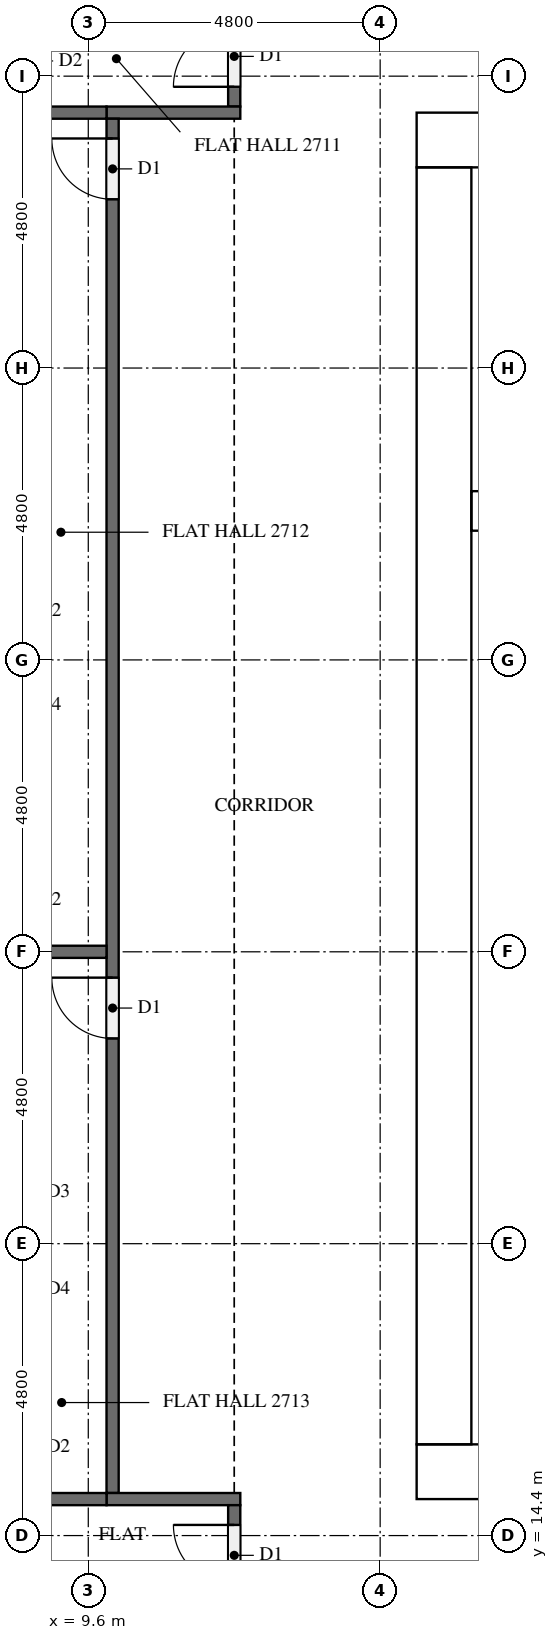
"""IFC4 building model, lengths in metres.
Left out: names, types, materials, properties, quantities, classifications, styles, units other than length and angle.
Written with IfcOpenShell. Run it as: python <this file> out.ifc"""

import sys

from ifc_helpers import new_model, si_unit, direction, frame, frame_2d, origin, place, context, subcontext, project, spatial, rectangle, extrude, element, fill, save


model = new_model("IFC4")
c1 = context("Model", 3, precision=1e-05, world=origin(), true_north=direction((0.0, 1.0)))
c2 = subcontext(c1, "Body", "Model", "MODEL_VIEW")
j1 = project(units=[si_unit("LENGTHUNIT", "METRE"), si_unit("PLANEANGLEUNIT", "RADIAN")], contexts=[c1])
p1 = place(None, origin())
s1 = spatial("IfcSite", under=j1, at=p1, CompositionType="ELEMENT")
p2 = place(p1, origin())
s2 = spatial("IfcBuilding", under=s1, at=p2, CompositionType="ELEMENT")
p3 = place(p2, frame((0.0, 0.0, 106.7)))
s3 = spatial("IfcBuildingStorey", under=s2, at=p3, CompositionType="ELEMENT", Elevation=106.7)
p4 = place(p3, frame((15.0, 15.45, 0.0), z_axis=(0.0, 0.0, 1.0), x_axis=(1.0, 0.0, 0.0)))
e1 = element("IfcWall", 1, at=p4, inside=s3, PredefinedType="SHEAR", context=c2, shape_type="SweptSolid", body=[
    extrude(rectangle(XDim=32.4, YDim=0.9, at=frame_2d((16.2, 0.0))), origin(), (0.0, 0.0, 1.0), 3.2),
])
p5 = place(p4, frame((15.3, 0.0, 0.0)))
e2 = element("IfcOpeningElement", 2, at=p5, cuts=e1, PredefinedType="OPENING", context=c2, shape_type="SweptSolid", body=[
    extrude(rectangle(XDim=1.8, YDim=2.1, at=frame_2d((0.9, 1.05))), frame((0.0, 0.46, 0.0), z_axis=(0.0, -1.0, 0.0), x_axis=(1.0, 0.0, 0.0)), (0.0, 0.0, 1.0), 0.92),
])
p6 = place(p3, frame((15.0, 37.35, 0.0), z_axis=(0.0, 0.0, 1.0), x_axis=(1.0, 0.0, 0.0)))
e3 = element("IfcWall", 3, at=p6, inside=s3, PredefinedType="SHEAR", context=c2, shape_type="SweptSolid", body=[
    extrude(rectangle(XDim=32.4, YDim=0.9, at=frame_2d((16.2, 0.0))), origin(), (0.0, 0.0, 1.0), 3.2),
])
p7 = place(p6, frame((15.3, 0.0, 0.0)))
e4 = element("IfcOpeningElement", 4, at=p7, cuts=e3, PredefinedType="OPENING", context=c2, shape_type="SweptSolid", body=[
    extrude(rectangle(XDim=1.8, YDim=2.1, at=frame_2d((0.9, 1.05))), frame((0.0, 0.46, 0.0), z_axis=(0.0, -1.0, 0.0), x_axis=(1.0, 0.0, 0.0)), (0.0, 0.0, 1.0), 0.92),
])
p8 = place(p6, frame((1.794, 0.0, 0.0)))
e5 = element("IfcOpeningElement", 5, at=p8, cuts=e3, PredefinedType="OPENING", context=c2, shape_type="SweptSolid", body=[
    extrude(rectangle(XDim=1.0, YDim=2.1, at=frame_2d((0.5, 1.05))), frame((0.0, 0.46, 0.0), z_axis=(0.0, -1.0, 0.0), x_axis=(1.0, 0.0, 0.0)), (0.0, 0.0, 1.0), 0.92),
])
p9 = place(p6, frame((5.331, 0.0, 0.0)))
e6 = element("IfcOpeningElement", 6, at=p9, cuts=e3, PredefinedType="OPENING", context=c2, shape_type="SweptSolid", body=[
    extrude(rectangle(XDim=1.0, YDim=2.1, at=frame_2d((0.5, 1.05))), frame((0.0, 0.46, 0.0), z_axis=(0.0, -1.0, 0.0), x_axis=(1.0, 0.0, 0.0)), (0.0, 0.0, 1.0), 0.92),
])
p10 = place(p3, frame((15.45, 15.9, 0.0), z_axis=(0.0, 0.0, 1.0), x_axis=(0.0, 1.0, 0.0)))
e7 = element("IfcWall", 7, at=p10, inside=s3, PredefinedType="SHEAR", context=c2, shape_type="SweptSolid", body=[
    extrude(rectangle(XDim=21.0, YDim=0.9, at=frame_2d((10.5, 0.0))), origin(), (0.0, 0.0, 1.0), 3.2),
])
p11 = place(p10, frame((4.86, 0.0, 0.0)))
e8 = element("IfcOpeningElement", 8, at=p11, cuts=e7, PredefinedType="OPENING", context=c2, shape_type="SweptSolid", body=[
    extrude(rectangle(XDim=1.2, YDim=2.1, at=frame_2d((0.6, 1.05))), frame((0.0, 0.46, 0.0), z_axis=(0.0, -1.0, 0.0), x_axis=(1.0, 0.0, 0.0)), (0.0, 0.0, 1.0), 0.92),
])
p12 = place(p3, frame((15.9, 31.25, 0.0), z_axis=(0.0, 0.0, 1.0), x_axis=(1.0, 0.0, 0.0)))
e9 = element("IfcWall", 9, at=p12, inside=s3, PredefinedType="SHEAR", context=c2, shape_type="SweptSolid", body=[
    extrude(rectangle(XDim=6.875, YDim=0.65, at=frame_2d((3.438, 0.0))), origin(), (0.0, 0.0, 1.0), 3.2),
])
p13 = place(p3, frame((12.0, 37.9, 0.0), z_axis=(0.0, 0.0, 1.0), x_axis=(0.0, 1.0, 0.0)))
e10 = element("IfcWall", 10, at=p13, inside=s3, PredefinedType="PARTITIONING", context=c2, shape_type="SweptSolid", body=[
    extrude(rectangle(XDim=2.8, YDim=0.2, at=frame_2d((1.4, 0.0))), origin(), (0.0, 0.0, 1.0), 3.2),
])
p14 = place(p13, frame((0.325, 0.0, 0.0)))
e11 = element("IfcOpeningElement", 11, at=p14, cuts=e10, PredefinedType="OPENING", context=c2, shape_type="SweptSolid", body=[
    extrude(rectangle(XDim=1.0, YDim=2.1, at=frame_2d((0.5, 1.05))), frame((0.0, 0.11, 0.0), z_axis=(0.0, -1.0, 0.0), x_axis=(1.0, 0.0, 0.0)), (0.0, 0.0, 1.0), 0.22),
])
p15 = place(p3, frame((12.1, 37.8, 0.0), z_axis=(0.0, 0.0, 1.0), x_axis=(-1.0, 0.0, 0.0)))
e12 = element("IfcWall", 12, at=p15, inside=s3, PredefinedType="PARTITIONING", context=c2, shape_type="SweptSolid", body=[
    extrude(rectangle(XDim=2.2, YDim=0.2, at=frame_2d((1.1, 0.0))), origin(), (0.0, 0.0, 1.0), 3.2),
])
p16 = place(p3, frame((10.0, 15.1, 0.0), z_axis=(0.0, 0.0, 1.0), x_axis=(0.0, 1.0, 0.0)))
e13 = element("IfcWall", 13, at=p16, inside=s3, PredefinedType="PARTITIONING", context=c2, shape_type="SweptSolid", body=[
    extrude(rectangle(XDim=22.6, YDim=0.2, at=frame_2d((11.3, 0.0))), origin(), (0.0, 0.0, 1.0), 3.2),
])
p17 = place(p16, frame((21.275, 0.0, 0.0)))
e14 = element("IfcOpeningElement", 14, at=p17, cuts=e13, PredefinedType="OPENING", context=c2, shape_type="SweptSolid", body=[
    extrude(rectangle(XDim=1.0, YDim=2.1, at=frame_2d((0.5, 1.05))), frame((0.0, 0.11, 0.0), z_axis=(0.0, -1.0, 0.0), x_axis=(1.0, 0.0, 0.0)), (0.0, 0.0, 1.0), 0.22),
])
p18 = place(p16, frame((7.475, 0.0, 0.0)))
e15 = element("IfcOpeningElement", 15, at=p18, cuts=e13, PredefinedType="OPENING", context=c2, shape_type="SweptSolid", body=[
    extrude(rectangle(XDim=1.0, YDim=2.1, at=frame_2d((0.5, 1.05))), frame((0.0, 0.11, 0.0), z_axis=(0.0, -1.0, 0.0), x_axis=(1.0, 0.0, 0.0)), (0.0, 0.0, 1.0), 0.22),
])
p19 = place(p3, frame((9.9, 15.0, 0.0), z_axis=(0.0, 0.0, 1.0), x_axis=(1.0, 0.0, 0.0)))
e16 = element("IfcWall", 16, at=p19, inside=s3, PredefinedType="PARTITIONING", context=c2, shape_type="SweptSolid", body=[
    extrude(rectangle(XDim=2.2, YDim=0.2, at=frame_2d((1.1, 0.0))), origin(), (0.0, 0.0, 1.0), 3.2),
])
p20 = place(p3, frame((12.0, 12.1, 0.0), z_axis=(0.0, 0.0, 1.0), x_axis=(0.0, 1.0, 0.0)))
e17 = element("IfcWall", 17, at=p20, inside=s3, PredefinedType="PARTITIONING", context=c2, shape_type="SweptSolid", body=[
    extrude(rectangle(XDim=2.8, YDim=0.2, at=frame_2d((1.4, 0.0))), origin(), (0.0, 0.0, 1.0), 3.2),
])
p21 = place(p20, frame((1.475, 0.0, 0.0)))
e18 = element("IfcOpeningElement", 18, at=p21, cuts=e17, PredefinedType="OPENING", context=c2, shape_type="SweptSolid", body=[
    extrude(rectangle(XDim=1.0, YDim=2.1, at=frame_2d((0.5, 1.05))), frame((0.0, 0.11, 0.0), z_axis=(0.0, -1.0, 0.0), x_axis=(1.0, 0.0, 0.0)), (0.0, 0.0, 1.0), 0.22),
])
p22 = place(p3, frame((5.225, 37.8, 0.0), z_axis=(0.0, 0.0, 1.0), x_axis=(1.0, 0.0, 0.0)))
e19 = element("IfcWall", 19, at=p22, inside=s3, PredefinedType="PARTITIONING", context=c2, shape_type="SweptSolid", body=[
    extrude(rectangle(XDim=4.675, YDim=0.2, at=frame_2d((2.337, 0.0))), origin(), (0.0, 0.0, 1.0), 3.2),
])
for number, where, z_axis, x_axis in (
    (20, (4.9, 24.0, 0.0), (0.0, 0.0, 1.0), (1.0, 0.0, 0.0)),
    (21, (4.9, 15.0, 0.0), (0.0, 0.0, 1.0), (1.0, 0.0, 0.0)),
):
    element("IfcWall", number, at=place(p3, frame(where, z_axis=z_axis, x_axis=x_axis)), inside=s3, PredefinedType="PARTITIONING", context=c2, shape_type="SweptSolid", body=[
        extrude(rectangle(XDim=5.0, YDim=0.2, at=frame_2d((2.5, 0.0))), origin(), (0.0, 0.0, 1.0), 3.2),
    ])
p23 = place(p11, frame((1.2, 0.0, 0.0), z_axis=(0.0, 0.0, 1.0), x_axis=(-1.0, 0.0, 0.0)))
e22 = element("IfcDoor", 22, at=p23, inside=s3, OperationType="SINGLE_SWING_RIGHT", PredefinedType="DOOR", context=c2, shape_type="SweptSolid", body=[
    extrude(rectangle(XDim=1.2, YDim=2.1, at=frame_2d((0.6, 1.05))), frame((0.0, 0.025, 0.0), z_axis=(0.0, -1.0, 0.0), x_axis=(1.0, 0.0, 0.0)), (0.0, 0.0, 1.0), 0.05),
])
fill(e8, e22)
p24 = place(p14, origin())
e23 = element("IfcDoor", 23, at=p24, inside=s3, OperationType="SINGLE_SWING_LEFT", PredefinedType="DOOR", context=c2, shape_type="SweptSolid", body=[
    extrude(rectangle(XDim=1.0, YDim=2.1, at=frame_2d((0.5, 1.05))), frame((0.0, 0.025, 0.0), z_axis=(0.0, -1.0, 0.0), x_axis=(1.0, 0.0, 0.0)), (0.0, 0.0, 1.0), 0.05),
])
fill(e11, e23)
p25 = place(p17, origin())
e24 = element("IfcDoor", 24, at=p25, inside=s3, OperationType="SINGLE_SWING_RIGHT", PredefinedType="DOOR", context=c2, shape_type="SweptSolid", body=[
    extrude(rectangle(XDim=1.0, YDim=2.1, at=frame_2d((0.5, 1.05))), frame((0.0, 0.025, 0.0), z_axis=(0.0, -1.0, 0.0), x_axis=(1.0, 0.0, 0.0)), (0.0, 0.0, 1.0), 0.05),
])
fill(e14, e24)
p26 = place(p18, origin())
e25 = element("IfcDoor", 25, at=p26, inside=s3, OperationType="SINGLE_SWING_RIGHT", PredefinedType="DOOR", context=c2, shape_type="SweptSolid", body=[
    extrude(rectangle(XDim=1.0, YDim=2.1, at=frame_2d((0.5, 1.05))), frame((0.0, 0.025, 0.0), z_axis=(0.0, -1.0, 0.0), x_axis=(1.0, 0.0, 0.0)), (0.0, 0.0, 1.0), 0.05),
])
fill(e15, e25)
p27 = place(p21, origin())
e26 = element("IfcDoor", 26, at=p27, inside=s3, OperationType="SINGLE_SWING_RIGHT", PredefinedType="DOOR", context=c2, shape_type="SweptSolid", body=[
    extrude(rectangle(XDim=1.0, YDim=2.1, at=frame_2d((0.5, 1.05))), frame((0.0, 0.025, 0.0), z_axis=(0.0, -1.0, 0.0), x_axis=(1.0, 0.0, 0.0)), (0.0, 0.0, 1.0), 0.05),
])
fill(e18, e26)
save(model, sys.argv[1])
